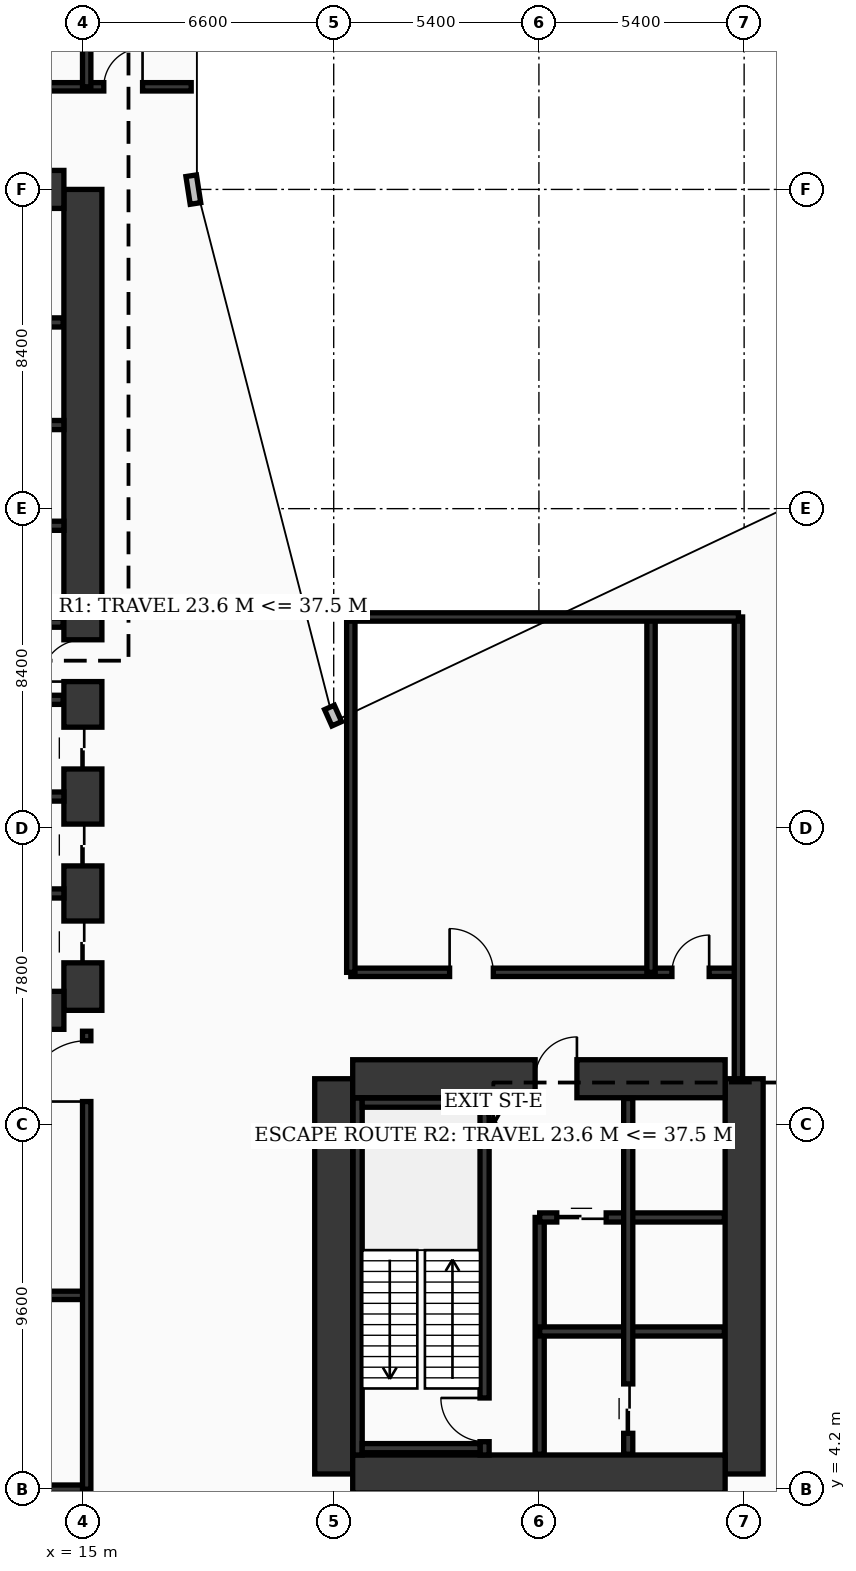
"""IFC4 building model, lengths in metres.
Left out: names, types, materials, properties, quantities, classifications, styles, units other than length and angle.
Written with IfcOpenShell. Run it as: python <this file> out.ifc"""

import sys

from ifc_helpers import new_model, si_unit, direction, frame, frame_2d, origin, origin_2d, place, context, subcontext, project, spatial, rectangle, hollow_rectangle, extrude, element, fill, save


model = new_model("IFC4")
c1 = context("Model", 3, precision=1e-05, world=origin(), true_north=direction((0.0, 1.0)))
c2 = subcontext(c1, "Body", "Model", "MODEL_VIEW")
j1 = project(units=[si_unit("LENGTHUNIT", "METRE"), si_unit("PLANEANGLEUNIT", "RADIAN")], contexts=[c1])
p1 = place(None, origin())
s1 = spatial("IfcSite", under=j1, at=p1, CompositionType="ELEMENT")
p2 = place(p1, origin())
s2 = spatial("IfcBuilding", under=s1, at=p2, CompositionType="ELEMENT")
p3 = place(p2, frame((0.0, 0.0, 46.0)))
s3 = spatial("IfcBuildingStorey", under=s2, at=p3, CompositionType="ELEMENT", Elevation=46.0)
p4 = place(p3, frame((15.0, 16.8, 0.0), z_axis=(0.0, 0.0, 1.0), x_axis=(0.0, 1.0, 0.0)))
e1 = element("IfcWall", 1, at=p4, inside=s3, PredefinedType="SHEAR", context=c2, shape_type="SweptSolid", body=[
    extrude(rectangle(XDim=21.6, YDim=1.0, at=frame_2d((10.8, 0.0))), origin(), (0.0, 0.0, 1.0), 4.56),
])
p5 = place(p4, frame((8.65, 0.0, 0.0)))
e2 = element("IfcOpeningElement", 2, at=p5, cuts=e1, PredefinedType="OPENING", context=c2, shape_type="SweptSolid", body=[
    extrude(rectangle(XDim=1.1, YDim=2.2, at=frame_2d((0.55, 1.1))), frame((0.0, 0.51, 0.0), z_axis=(0.0, -1.0, 0.0), x_axis=(1.0, 0.0, 0.0)), (0.0, 0.0, 1.0), 1.02),
])
p6 = place(p4, frame((1.25, 0.0, 0.0)))
e3 = element("IfcOpeningElement", 3, at=p6, cuts=e1, PredefinedType="OPENING", context=c2, shape_type="SweptSolid", body=[
    extrude(rectangle(XDim=1.1, YDim=2.2, at=frame_2d((0.55, 1.1))), frame((0.0, 0.51, 0.0), z_axis=(0.0, -1.0, 0.0), x_axis=(1.0, 0.0, 0.0)), (0.0, 0.0, 1.0), 1.02),
])
p7 = place(p4, frame((3.8, 0.0, 0.0)))
e4 = element("IfcOpeningElement", 4, at=p7, cuts=e1, PredefinedType="OPENING", context=c2, shape_type="SweptSolid", body=[
    extrude(rectangle(XDim=1.1, YDim=2.2, at=frame_2d((0.55, 1.1))), frame((0.0, 0.51, 0.0), z_axis=(0.0, -1.0, 0.0), x_axis=(1.0, 0.0, 0.0)), (0.0, 0.0, 1.0), 1.02),
])
p8 = place(p4, frame((6.35, 0.0, 0.0)))
e5 = element("IfcOpeningElement", 5, at=p8, cuts=e1, PredefinedType="OPENING", context=c2, shape_type="SweptSolid", body=[
    extrude(rectangle(XDim=1.1, YDim=2.2, at=frame_2d((0.55, 1.1))), frame((0.0, 0.51, 0.0), z_axis=(0.0, -1.0, 0.0), x_axis=(1.0, 0.0, 0.0)), (0.0, 0.0, 1.0), 1.02),
])
for number, where, z_axis, x_axis in (
    (6, (4.7, 38.4, 0.0), (0.0, 0.0, 1.0), (1.0, 0.0, 0.0)),
    (7, (4.7, 16.8, 0.0), (0.0, 0.0, 1.0), (1.0, 0.0, 0.0)),
):
    element("IfcWall", number, at=place(p3, frame(where, z_axis=z_axis, x_axis=x_axis)), inside=s3, PredefinedType="SHEAR", context=c2, shape_type="SweptSolid", body=[
        extrude(rectangle(XDim=9.8, YDim=1.0, at=frame_2d((4.9, 0.0))), origin(), (0.0, 0.0, 1.0), 4.56),
    ])
for number, where, z_axis, x_axis in (
    (8, (21.6, 4.6, 0.0), (0.0, 0.0, 1.0), (0.0, 1.0, 0.0)),
    (9, (32.4, 4.6, 0.0), (0.0, 0.0, 1.0), (0.0, 1.0, 0.0)),
):
    element("IfcWall", number, at=place(p3, frame(where, z_axis=z_axis, x_axis=x_axis)), inside=s3, PredefinedType="SHEAR", context=c2, shape_type="SweptSolid", body=[
        extrude(rectangle(XDim=10.4, YDim=1.0, at=frame_2d((5.2, 0.0))), origin(), (0.0, 0.0, 1.0), 4.56),
    ])
p9 = place(p3, frame((22.1, 15.0, 0.0), z_axis=(0.0, 0.0, 1.0), x_axis=(1.0, 0.0, 0.0)))
e10 = element("IfcWall", 10, at=p9, inside=s3, PredefinedType="SHEAR", context=c2, shape_type="SweptSolid", body=[
    extrude(rectangle(XDim=9.8, YDim=1.0, at=frame_2d((4.9, 0.0))), origin(), (0.0, 0.0, 1.0), 4.56),
])
p10 = place(p9, frame((4.8, 0.0, 0.0)))
e11 = element("IfcOpeningElement", 11, at=p10, cuts=e10, PredefinedType="OPENING", context=c2, shape_type="SweptSolid", body=[
    extrude(rectangle(XDim=1.1, YDim=2.2, at=frame_2d((0.55, 1.1))), frame((0.0, 0.51, 0.0), z_axis=(0.0, -1.0, 0.0), x_axis=(1.0, 0.0, 0.0)), (0.0, 0.0, 1.0), 1.02),
])
p11 = place(p3, frame((22.1, 4.6, 0.0), z_axis=(0.0, 0.0, 1.0), x_axis=(1.0, 0.0, 0.0)))
e12 = element("IfcWall", 12, at=p11, inside=s3, PredefinedType="SHEAR", context=c2, shape_type="SweptSolid", body=[
    extrude(rectangle(XDim=9.8, YDim=1.0, at=frame_2d((4.9, 0.0))), origin(), (0.0, 0.0, 1.0), 4.56),
])
p12 = place(p3, frame((22.23, 5.1, 0.0), z_axis=(0.0, 0.0, 1.0), x_axis=(0.0, 1.0, 0.0)))
e13 = element("IfcWall", 13, at=p12, inside=s3, PredefinedType="SOLIDWALL", context=c2, shape_type="SweptSolid", body=[
    extrude(rectangle(XDim=9.39, YDim=0.24, at=frame_2d((4.695, 0.0))), origin(), (0.0, 0.0, 1.0), 4.56),
])
p13 = place(p3, frame((25.57, 5.1, 0.0), z_axis=(0.0, 0.0, 1.0), x_axis=(0.0, 1.0, 0.0)))
e14 = element("IfcWall", 14, at=p13, inside=s3, PredefinedType="SOLIDWALL", context=c2, shape_type="SweptSolid", body=[
    extrude(rectangle(XDim=9.39, YDim=0.24, at=frame_2d((4.695, 0.0))), origin(), (0.0, 0.0, 1.0), 4.56),
])
p14 = place(p13, frame((0.35, 0.0, 0.0)))
e15 = element("IfcOpeningElement", 15, at=p14, cuts=e14, PredefinedType="OPENING", context=c2, shape_type="SweptSolid", body=[
    extrude(rectangle(XDim=1.15, YDim=2.2, at=frame_2d((0.575, 1.1))), frame((0.0, 0.13, 0.0), z_axis=(0.0, -1.0, 0.0), x_axis=(1.0, 0.0, 0.0)), (0.0, 0.0, 1.0), 0.26),
])
for number, where, z_axis, x_axis in (
    (16, (22.35, 5.28, 0.0), (0.0, 0.0, 1.0), (1.0, 0.0, 0.0)),
    (17, (22.35, 14.37, 0.0), (0.0, 0.0, 1.0), (1.0, 0.0, 0.0)),
):
    element("IfcWall", number, at=place(p3, frame(where, z_axis=z_axis, x_axis=x_axis)), inside=s3, PredefinedType="SOLIDWALL", context=c2, shape_type="SweptSolid", body=[
        extrude(rectangle(XDim=3.1, YDim=0.24, at=frame_2d((1.55, 0.0))), origin(), (0.0, 0.0, 1.0), 4.56),
    ])
for number, where, z_axis, x_axis in (
    (18, (12.18, 19.875, 0.0), (0.0, 0.0, 1.0), (1.0, 0.0, 0.0)),
    (19, (12.18, 22.425, 0.0), (0.0, 0.0, 1.0), (1.0, 0.0, 0.0)),
    (20, (12.18, 29.55, 0.0), (0.0, 0.0, 1.0), (1.0, 0.0, 0.0)),
    (21, (12.18, 32.2, 0.0), (0.0, 0.0, 1.0), (1.0, 0.0, 0.0)),
):
    element("IfcWall", number, at=place(p3, frame(where, z_axis=z_axis, x_axis=x_axis)), inside=s3, PredefinedType="SOLIDWALL", context=c2, shape_type="SweptSolid", body=[
        extrude(rectangle(XDim=2.32, YDim=0.24, at=frame_2d((1.16, 0.0))), origin(), (0.0, 0.0, 1.0), 4.56),
    ])
for number, where, z_axis, x_axis in (
    (22, (21.0, 25.0, 0.0), (0.0, 0.0, 1.0), (1.0, 0.0, 0.0)),
    (23, (19.6, 3.6, 0.0), (0.0, 0.0, 1.0), (1.0, 0.0, 0.0)),
):
    element("IfcColumn", number, at=place(p3, frame(where, z_axis=z_axis, x_axis=x_axis)), inside=s3, PredefinedType="COLUMN", context=c2, shape_type="SweptSolid", body=[
        extrude(hollow_rectangle(XDim=1.1, YDim=1.1, WallThickness=0.045, at=origin_2d()), origin(), (0.0, 0.0, 1.0), 4.56),
    ])
p15 = place(p3, frame((21.68, 24.34, 0.0), z_axis=(0.0, 0.0, 1.0), x_axis=(-0.40758134973, 0.913168901875, 0.0)))
e24 = element("IfcWall", 24, at=p15, inside=s3, PredefinedType="SOLIDWALL", context=c2, shape_type="SweptSolid", body=[
    extrude(rectangle(XDim=0.471, YDim=0.28, at=frame_2d((0.235, 0.0))), origin(), (0.0, 0.0, 1.0), 4.56),
])
p16 = place(p3, frame((17.962, 38.03, 0.0), z_axis=(0.0, 0.0, 1.0), x_axis=(-0.15141125477, 0.988470855377, 0.0)))
e25 = element("IfcWall", 25, at=p16, inside=s3, PredefinedType="SOLIDWALL", context=c2, shape_type="SweptSolid", body=[
    extrude(rectangle(XDim=0.739, YDim=0.28, at=frame_2d((0.369, 0.0))), origin(), (0.0, 0.0, 1.0), 4.56),
])
p17 = place(p3, frame((12.15, 24.97, 0.0), z_axis=(0.0, 0.0, 1.0), x_axis=(1.0, 0.0, 0.0)))
e26 = element("IfcWall", 26, at=p17, inside=s3, PredefinedType="SOLIDWALL", context=c2, shape_type="SweptSolid", body=[
    extrude(rectangle(XDim=2.33, YDim=0.24, at=frame_2d((1.165, 0.0))), origin(), (0.0, 0.0, 1.0), 3.84),
])
p18 = place(p3, frame((12.25, 27.0, 0.0), z_axis=(0.0, 0.0, 1.0), x_axis=(1.0, 0.0, 0.0)))
e27 = element("IfcWall", 27, at=p18, inside=s3, PredefinedType="SOLIDWALL", context=c2, shape_type="SweptSolid", body=[
    extrude(rectangle(XDim=2.23, YDim=0.24, at=frame_2d((1.115, 0.0))), origin(), (0.0, 0.0, 1.0), 4.56),
])
p19 = place(p3, frame((9.66, 34.9, 0.0), z_axis=(0.0, 0.0, 1.0), x_axis=(1.0, 0.0, 0.0)))
e28 = element("IfcWall", 28, at=p19, inside=s3, PredefinedType="SOLIDWALL", context=c2, shape_type="SweptSolid", body=[
    extrude(rectangle(XDim=4.82, YDim=0.24, at=frame_2d((2.41, 0.0))), origin(), (0.0, 0.0, 1.0), 4.56),
])
p20 = place(p3, frame((27.02, 5.12, 0.0), z_axis=(0.0, 0.0, 1.0), x_axis=(0.0, 1.0, 0.0)))
e29 = element("IfcWall", 29, at=p20, inside=s3, PredefinedType="SOLIDWALL", context=c2, shape_type="SweptSolid", body=[
    extrude(rectangle(XDim=6.23, YDim=0.24, at=frame_2d((3.115, 0.0))), origin(), (0.0, 0.0, 1.0), 4.56),
])
p21 = place(p3, frame((27.02, 11.35, 0.0), z_axis=(0.0, 0.0, 1.0), x_axis=(1.0, 0.0, 0.0)))
e30 = element("IfcWall", 30, at=p21, inside=s3, PredefinedType="SOLIDWALL", context=c2, shape_type="SweptSolid", body=[
    extrude(rectangle(XDim=4.86, YDim=0.24, at=frame_2d((2.43, 0.0))), origin(), (0.0, 0.0, 1.0), 4.56),
])
p22 = place(p21, frame((0.45, 0.0, 0.0)))
e31 = element("IfcOpeningElement", 31, at=p22, cuts=e30, PredefinedType="OPENING", context=c2, shape_type="SweptSolid", body=[
    extrude(rectangle(XDim=1.3, YDim=2.35, at=frame_2d((0.65, 1.175))), frame((0.0, 0.13, 0.0), z_axis=(0.0, -1.0, 0.0), x_axis=(1.0, 0.0, 0.0)), (0.0, 0.0, 1.0), 0.26),
])
p23 = place(p3, frame((27.02, 8.35, 0.0), z_axis=(0.0, 0.0, 1.0), x_axis=(1.0, 0.0, 0.0)))
e32 = element("IfcWall", 32, at=p23, inside=s3, PredefinedType="SOLIDWALL", context=c2, shape_type="SweptSolid", body=[
    extrude(rectangle(XDim=4.86, YDim=0.24, at=frame_2d((2.43, 0.0))), origin(), (0.0, 0.0, 1.0), 4.09),
])
p24 = place(p3, frame((29.35, 5.12, 0.0), z_axis=(0.0, 0.0, 1.0), x_axis=(0.0, 1.0, 0.0)))
e33 = element("IfcWall", 33, at=p24, inside=s3, PredefinedType="SOLIDWALL", context=c2, shape_type="SweptSolid", body=[
    extrude(rectangle(XDim=9.36, YDim=0.24, at=frame_2d((4.68, 0.0))), origin(), (0.0, 0.0, 1.0), 4.56),
])
p25 = place(p24, frame((0.55, 0.0, 0.0)))
e34 = element("IfcOpeningElement", 34, at=p25, cuts=e33, PredefinedType="OPENING", context=c2, shape_type="SweptSolid", body=[
    extrude(rectangle(XDim=1.3, YDim=2.35, at=frame_2d((0.65, 1.175))), frame((0.0, 0.13, 0.0), z_axis=(0.0, -1.0, 0.0), x_axis=(1.0, 0.0, 0.0)), (0.0, 0.0, 1.0), 0.26),
])
p26 = place(p3, frame((4.2, 4.2, 0.0), z_axis=(0.0, 0.0, 1.0), x_axis=(1.0, 0.0, 0.0)))
e35 = element("IfcWall", 35, at=p26, inside=s3, PredefinedType="SOLIDWALL", context=c2, shape_type="SweptSolid", body=[
    extrude(rectangle(XDim=10.9, YDim=0.22, at=frame_2d((5.45, 0.0))), origin(), (0.0, 0.0, 1.0), 3.84),
])
p27 = place(p3, frame((4.2, 41.1, 0.0), z_axis=(0.0, 0.0, 1.0), x_axis=(1.0, 0.0, 0.0)))
e36 = element("IfcWall", 36, at=p27, inside=s3, PredefinedType="SOLIDWALL", context=c2, shape_type="SweptSolid", body=[
    extrude(rectangle(XDim=13.65, YDim=0.22, at=frame_2d((6.825, 0.0))), origin(), (0.0, 0.0, 1.0), 3.84),
])
p28 = place(p27, frame((1.8, 0.0, 0.0)))
e37 = element("IfcOpeningElement", 37, at=p28, cuts=e36, PredefinedType="OPENING", context=c2, shape_type="SweptSolid", body=[
    extrude(rectangle(XDim=0.98, YDim=2.15, at=frame_2d((0.49, 1.075))), frame((0.0, 0.12, 0.0), z_axis=(0.0, -1.0, 0.0), x_axis=(1.0, 0.0, 0.0)), (0.0, 0.0, 1.0), 0.24),
])
p29 = place(p27, frame((6.8, 0.0, 0.0)))
e38 = element("IfcOpeningElement", 38, at=p29, cuts=e36, PredefinedType="OPENING", context=c2, shape_type="SweptSolid", body=[
    extrude(rectangle(XDim=1.15, YDim=2.2, at=frame_2d((0.575, 1.1))), frame((0.0, 0.12, 0.0), z_axis=(0.0, -1.0, 0.0), x_axis=(1.0, 0.0, 0.0)), (0.0, 0.0, 1.0), 0.24),
])
p30 = place(p27, frame((11.35, 0.0, 0.0)))
e39 = element("IfcOpeningElement", 39, at=p30, cuts=e36, PredefinedType="OPENING", context=c2, shape_type="SweptSolid", body=[
    extrude(rectangle(XDim=1.02, YDim=2.2, at=frame_2d((0.51, 1.1))), frame((0.0, 0.12, 0.0), z_axis=(0.0, -1.0, 0.0), x_axis=(1.0, 0.0, 0.0)), (0.0, 0.0, 1.0), 0.24),
])
p31 = place(p3, frame((15.1, 41.1, 0.0), z_axis=(0.0, 0.0, 1.0), x_axis=(0.0, 1.0, 0.0)))
e40 = element("IfcWall", 40, at=p31, inside=s3, PredefinedType="SOLIDWALL", context=c2, shape_type="SweptSolid", body=[
    extrude(rectangle(XDim=6.7, YDim=0.22, at=frame_2d((3.35, 0.0))), origin(), (0.0, 0.0, 1.0), 3.84),
])
p32 = place(p3, frame((22.05, 17.8, 0.0), z_axis=(0.0, 0.0, 1.0), x_axis=(1.0, 0.0, 0.0)))
e41 = element("IfcWall", 41, at=p32, inside=s3, PredefinedType="SOLIDWALL", context=c2, shape_type="SweptSolid", body=[
    extrude(rectangle(XDim=10.2, YDim=0.22, at=frame_2d((5.1, 0.0))), origin(), (0.0, 0.0, 1.0), 3.84),
])
p33 = place(p32, frame((2.6, 0.0, 0.0)))
e42 = element("IfcOpeningElement", 42, at=p33, cuts=e41, PredefinedType="OPENING", context=c2, shape_type="SweptSolid", body=[
    extrude(rectangle(XDim=1.15, YDim=2.2, at=frame_2d((0.575, 1.1))), frame((0.0, 0.12, 0.0), z_axis=(0.0, -1.0, 0.0), x_axis=(1.0, 0.0, 0.0)), (0.0, 0.0, 1.0), 0.24),
])
p34 = place(p32, frame((8.45, 0.0, 0.0)))
e43 = element("IfcOpeningElement", 43, at=p34, cuts=e41, PredefinedType="OPENING", context=c2, shape_type="SweptSolid", body=[
    extrude(rectangle(XDim=0.98, YDim=2.15, at=frame_2d((0.49, 1.075))), frame((0.0, 0.12, 0.0), z_axis=(0.0, -1.0, 0.0), x_axis=(1.0, 0.0, 0.0)), (0.0, 0.0, 1.0), 0.24),
])
p35 = place(p3, frame((29.95, 17.8, 0.0), z_axis=(0.0, 0.0, 1.0), x_axis=(0.0, 1.0, 0.0)))
e44 = element("IfcWall", 44, at=p35, inside=s3, PredefinedType="SOLIDWALL", context=c2, shape_type="SweptSolid", body=[
    extrude(rectangle(XDim=9.35, YDim=0.22, at=frame_2d((4.675, 0.0))), origin(), (0.0, 0.0, 1.0), 3.84),
])
p36 = place(p3, frame((22.05, 17.8, 0.0), z_axis=(0.0, 0.0, 1.0), x_axis=(0.0, 1.0, 0.0)))
e45 = element("IfcWall", 45, at=p36, inside=s3, PredefinedType="SOLIDWALL", context=c2, shape_type="SweptSolid", body=[
    extrude(rectangle(XDim=9.35, YDim=0.22, at=frame_2d((4.675, 0.0))), origin(), (0.0, 0.0, 1.0), 4.04),
])
p37 = place(p3, frame((32.25, 15.0, 0.0), z_axis=(0.0, 0.0, 1.0), x_axis=(0.0, 1.0, 0.0)))
e46 = element("IfcWall", 46, at=p37, inside=s3, PredefinedType="SOLIDWALL", context=c2, shape_type="SweptSolid", body=[
    extrude(rectangle(XDim=12.15, YDim=0.22, at=frame_2d((6.075, 0.0))), origin(), (0.0, 0.0, 1.0), 3.84),
])
p38 = place(p3, frame((22.05, 27.15, 0.0), z_axis=(0.0, 0.0, 1.0), x_axis=(1.0, 0.0, 0.0)))
e47 = element("IfcWall", 47, at=p38, inside=s3, PredefinedType="SOLIDWALL", context=c2, shape_type="SweptSolid", body=[
    extrude(rectangle(XDim=10.2, YDim=0.22, at=frame_2d((5.1, 0.0))), origin(), (0.0, 0.0, 1.0), 4.04),
])
p39 = place(p3, frame((4.2, 9.3, 0.0), z_axis=(0.0, 0.0, 1.0), x_axis=(1.0, 0.0, 0.0)))
e48 = element("IfcWall", 48, at=p39, inside=s3, PredefinedType="SOLIDWALL", context=c2, shape_type="SweptSolid", body=[
    extrude(rectangle(XDim=10.9, YDim=0.22, at=frame_2d((5.45, 0.0))), origin(), (0.0, 0.0, 1.0), 3.84),
])
p40 = place(p39, frame((4.5, 0.0, 0.0)))
e49 = element("IfcOpeningElement", 49, at=p40, cuts=e48, PredefinedType="OPENING", context=c2, shape_type="SweptSolid", body=[
    extrude(rectangle(XDim=1.6, YDim=2.35, at=frame_2d((0.8, 1.175))), frame((0.0, 0.12, 0.0), z_axis=(0.0, -1.0, 0.0), x_axis=(1.0, 0.0, 0.0)), (0.0, 0.0, 1.0), 0.24),
])
p41 = place(p3, frame((15.1, 4.2, 0.0), z_axis=(0.0, 0.0, 1.0), x_axis=(0.0, 1.0, 0.0)))
e50 = element("IfcWall", 50, at=p41, inside=s3, PredefinedType="SOLIDWALL", context=c2, shape_type="SweptSolid", body=[
    extrude(rectangle(XDim=12.05, YDim=0.22, at=frame_2d((6.025, 0.0))), origin(), (0.0, 0.0, 1.0), 3.34),
])
p42 = place(p41, frame((10.2, 0.0, 0.0)))
e51 = element("IfcOpeningElement", 51, at=p42, cuts=e50, PredefinedType="OPENING", context=c2, shape_type="SweptSolid", body=[
    extrude(rectangle(XDim=1.6, YDim=2.35, at=frame_2d((0.8, 1.175))), frame((0.0, 0.12, 0.0), z_axis=(0.0, -1.0, 0.0), x_axis=(1.0, 0.0, 0.0)), (0.0, 0.0, 1.0), 0.24),
])
p43 = place(p22, origin())
e52 = element("IfcDoor", 52, at=p43, inside=s3, OperationType="DOUBLE_DOOR_SLIDING", PredefinedType="DOOR", context=c2, shape_type="SweptSolid", body=[
    extrude(rectangle(XDim=1.3, YDim=2.35, at=frame_2d((0.65, 1.175))), frame((0.0, 0.025, 0.0), z_axis=(0.0, -1.0, 0.0), x_axis=(1.0, 0.0, 0.0)), (0.0, 0.0, 1.0), 0.05),
])
fill(e31, e52)
p44 = place(p25, origin())
e53 = element("IfcDoor", 53, at=p44, inside=s3, OperationType="DOUBLE_DOOR_SLIDING", PredefinedType="DOOR", context=c2, shape_type="SweptSolid", body=[
    extrude(rectangle(XDim=1.3, YDim=2.35, at=frame_2d((0.65, 1.175))), frame((0.0, 0.025, 0.0), z_axis=(0.0, -1.0, 0.0), x_axis=(1.0, 0.0, 0.0)), (0.0, 0.0, 1.0), 0.05),
])
fill(e34, e53)
p45 = place(p30, origin())
e54 = element("IfcDoor", 54, at=p45, inside=s3, OperationType="SINGLE_SWING_RIGHT", PredefinedType="DOOR", context=c2, shape_type="SweptSolid", body=[
    extrude(rectangle(XDim=1.02, YDim=2.2, at=frame_2d((0.51, 1.1))), frame((0.0, 0.025, 0.0), z_axis=(0.0, -1.0, 0.0), x_axis=(1.0, 0.0, 0.0)), (0.0, 0.0, 1.0), 0.05),
])
fill(e39, e54)
p46 = place(p33, origin())
e55 = element("IfcDoor", 55, at=p46, inside=s3, OperationType="SINGLE_SWING_LEFT", PredefinedType="DOOR", context=c2, shape_type="SweptSolid", body=[
    extrude(rectangle(XDim=1.15, YDim=2.2, at=frame_2d((0.575, 1.1))), frame((0.0, 0.025, 0.0), z_axis=(0.0, -1.0, 0.0), x_axis=(1.0, 0.0, 0.0)), (0.0, 0.0, 1.0), 0.05),
])
fill(e42, e55)
p47 = place(p34, origin())
e56 = element("IfcDoor", 56, at=p47, inside=s3, OperationType="SINGLE_SWING_RIGHT", PredefinedType="DOOR", context=c2, shape_type="SweptSolid", body=[
    extrude(rectangle(XDim=0.98, YDim=2.15, at=frame_2d((0.49, 1.075))), frame((0.0, 0.025, 0.0), z_axis=(0.0, -1.0, 0.0), x_axis=(1.0, 0.0, 0.0)), (0.0, 0.0, 1.0), 0.05),
])
fill(e43, e56)
p48 = place(p42, origin())
e57 = element("IfcDoor", 57, at=p48, inside=s3, OperationType="SINGLE_SWING_LEFT", PredefinedType="DOOR", context=c2, shape_type="SweptSolid", body=[
    extrude(rectangle(XDim=1.6, YDim=2.35, at=frame_2d((0.8, 1.175))), frame((0.0, 0.025, 0.0), z_axis=(0.0, -1.0, 0.0), x_axis=(1.0, 0.0, 0.0)), (0.0, 0.0, 1.0), 0.05),
])
fill(e51, e57)
p49 = place(p14, origin())
e58 = element("IfcDoor", 58, at=p49, inside=s3, OperationType="SINGLE_SWING_RIGHT", PredefinedType="DOOR", context=c2, shape_type="SweptSolid", body=[
    extrude(rectangle(XDim=1.15, YDim=2.2, at=frame_2d((0.575, 1.1))), frame((0.0, 0.025, 0.0), z_axis=(0.0, -1.0, 0.0), x_axis=(1.0, 0.0, 0.0)), (0.0, 0.0, 1.0), 0.05),
])
fill(e15, e58)
p50 = place(p5, origin())
e59 = element("IfcDoor", 59, at=p50, inside=s3, OperationType="SINGLE_SWING_LEFT", PredefinedType="DOOR", context=c2, shape_type="SweptSolid", body=[
    extrude(rectangle(XDim=1.1, YDim=2.2, at=frame_2d((0.55, 1.1))), frame((0.0, 0.025, 0.0), z_axis=(0.0, -1.0, 0.0), x_axis=(1.0, 0.0, 0.0)), (0.0, 0.0, 1.0), 0.05),
])
fill(e2, e59)
p51 = place(p6, origin())
e60 = element("IfcDoor", 60, at=p51, inside=s3, OperationType="DOUBLE_DOOR_SLIDING", PredefinedType="DOOR", context=c2, shape_type="SweptSolid", body=[
    extrude(rectangle(XDim=1.1, YDim=2.2, at=frame_2d((0.55, 1.1))), frame((0.0, 0.025, 0.0), z_axis=(0.0, -1.0, 0.0), x_axis=(1.0, 0.0, 0.0)), (0.0, 0.0, 1.0), 0.05),
])
fill(e3, e60)
p52 = place(p7, origin())
e61 = element("IfcDoor", 61, at=p52, inside=s3, OperationType="DOUBLE_DOOR_SLIDING", PredefinedType="DOOR", context=c2, shape_type="SweptSolid", body=[
    extrude(rectangle(XDim=1.1, YDim=2.2, at=frame_2d((0.55, 1.1))), frame((0.0, 0.025, 0.0), z_axis=(0.0, -1.0, 0.0), x_axis=(1.0, 0.0, 0.0)), (0.0, 0.0, 1.0), 0.05),
])
fill(e4, e61)
p53 = place(p8, origin())
e62 = element("IfcDoor", 62, at=p53, inside=s3, OperationType="DOUBLE_DOOR_SLIDING", PredefinedType="DOOR", context=c2, shape_type="SweptSolid", body=[
    extrude(rectangle(XDim=1.1, YDim=2.2, at=frame_2d((0.55, 1.1))), frame((0.0, 0.025, 0.0), z_axis=(0.0, -1.0, 0.0), x_axis=(1.0, 0.0, 0.0)), (0.0, 0.0, 1.0), 0.05),
])
fill(e5, e62)
p54 = place(p10, origin())
e63 = element("IfcDoor", 63, at=p54, inside=s3, OperationType="SINGLE_SWING_RIGHT", PredefinedType="DOOR", context=c2, shape_type="SweptSolid", body=[
    extrude(rectangle(XDim=1.1, YDim=2.2, at=frame_2d((0.55, 1.1))), frame((0.0, 0.025, 0.0), z_axis=(0.0, -1.0, 0.0), x_axis=(1.0, 0.0, 0.0)), (0.0, 0.0, 1.0), 0.05),
])
fill(e11, e63)
save(model, sys.argv[1])
